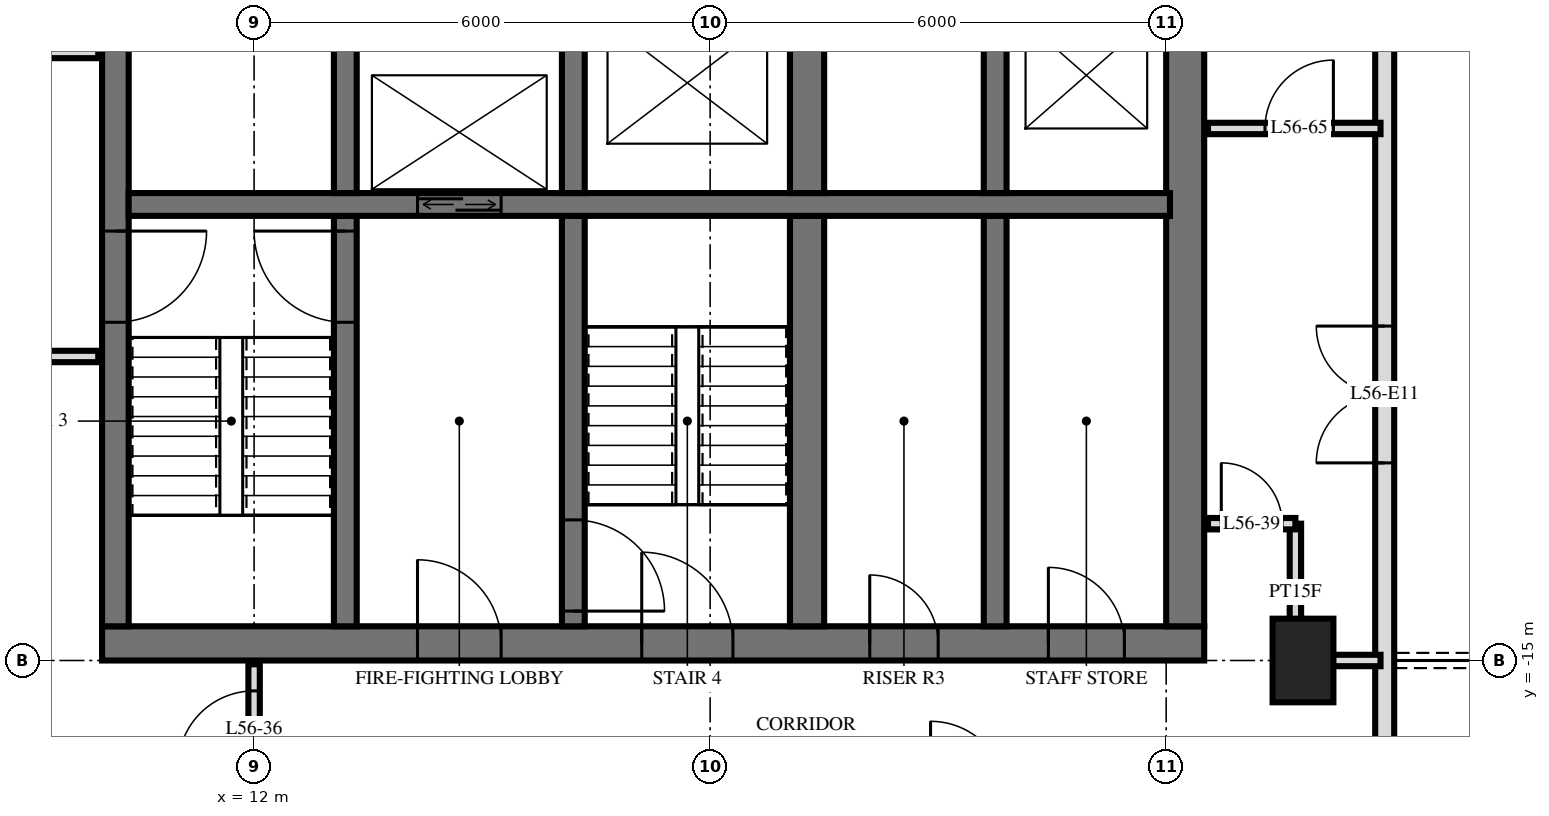
"""IFC4 building model, lengths in metres.
Left out: names, types, materials, properties, quantities, classifications, styles, units other than length and angle.
Written with IfcOpenShell. Run it as: python <this file> out.ifc"""

import sys

from ifc_helpers import new_model, si_unit, direction, frame, frame_2d, origin, origin_2d, place, context, subcontext, project, spatial, rectangle, extrude, element, fill, save


model = new_model("IFC4")
c1 = context("Model", 3, precision=1e-05, world=origin(), true_north=direction((0.0, 1.0)))
c2 = subcontext(c1, "Body", "Model", "MODEL_VIEW")
j1 = project(units=[si_unit("LENGTHUNIT", "METRE"), si_unit("PLANEANGLEUNIT", "RADIAN")], contexts=[c1])
p1 = place(None, origin())
s1 = spatial("IfcSite", under=j1, at=p1, CompositionType="ELEMENT")
p2 = place(p1, origin())
s2 = spatial("IfcBuilding", under=s1, at=p2, CompositionType="ELEMENT")
p3 = place(p2, frame((0.0, 0.0, 215.1)))
s3 = spatial("IfcBuildingStorey", under=s2, at=p3, CompositionType="ELEMENT", Elevation=215.1)
p4 = place(p3, frame((25.8, -15.0, 0.0), z_axis=(0.0, 0.0, 1.0), x_axis=(0.0, 1.0, 0.0)))
e1 = element("IfcColumn", 1, at=p4, inside=s3, PredefinedType="COLUMN", context=c2, shape_type="SweptSolid", body=[
    extrude(rectangle(XDim=1.1, YDim=0.8, at=origin_2d()), origin(), (0.0, 0.0, 1.0), 3.5),
])
p5 = place(p3, frame((10.0, -14.775, 0.0), z_axis=(0.0, 0.0, 1.0), x_axis=(1.0, 0.0, 0.0)))
e2 = element("IfcWall", 2, at=p5, inside=s3, PredefinedType="SHEAR", context=c2, shape_type="SweptSolid", body=[
    extrude(rectangle(XDim=14.5, YDim=0.45, at=frame_2d((7.25, 0.0))), origin(), (0.0, 0.0, 1.0), 3.5),
])
p6 = place(p5, frame((7.1, 0.0, 0.0)))
e3 = element("IfcOpeningElement", 3, at=p6, cuts=e2, PredefinedType="OPENING", context=c2, shape_type="SweptSolid", body=[
    extrude(rectangle(XDim=1.2, YDim=2.1, at=frame_2d((0.6, 1.05))), frame((0.0, 0.235, 0.0), z_axis=(0.0, -1.0, 0.0), x_axis=(1.0, 0.0, 0.0)), (0.0, 0.0, 1.0), 0.47),
])
p7 = place(p5, frame((4.15, 0.0, 0.0)))
e4 = element("IfcOpeningElement", 4, at=p7, cuts=e2, PredefinedType="OPENING", context=c2, shape_type="SweptSolid", body=[
    extrude(rectangle(XDim=1.1, YDim=2.1, at=frame_2d((0.55, 1.05))), frame((0.0, 0.235, 0.0), z_axis=(0.0, -1.0, 0.0), x_axis=(1.0, 0.0, 0.0)), (0.0, 0.0, 1.0), 0.47),
])
p8 = place(p5, frame((10.1, 0.0, 0.0)))
e5 = element("IfcOpeningElement", 5, at=p8, cuts=e2, PredefinedType="OPENING", context=c2, shape_type="SweptSolid", body=[
    extrude(rectangle(XDim=0.9, YDim=2.1, at=frame_2d((0.45, 1.05))), frame((0.0, 0.235, 0.0), z_axis=(0.0, -1.0, 0.0), x_axis=(1.0, 0.0, 0.0)), (0.0, 0.0, 1.0), 0.47),
])
p9 = place(p5, frame((12.45, 0.0, 0.0)))
e6 = element("IfcOpeningElement", 6, at=p9, cuts=e2, PredefinedType="OPENING", context=c2, shape_type="SweptSolid", body=[
    extrude(rectangle(XDim=1.0, YDim=2.1, at=frame_2d((0.5, 1.05))), frame((0.0, 0.235, 0.0), z_axis=(0.0, -1.0, 0.0), x_axis=(1.0, 0.0, 0.0)), (0.0, 0.0, 1.0), 0.47),
])
p10 = place(p3, frame((10.175, -14.55, 0.0), z_axis=(0.0, 0.0, 1.0), x_axis=(0.0, 1.0, 0.0)))
e7 = element("IfcWall", 7, at=p10, inside=s3, PredefinedType="SHEAR", context=c2, shape_type="SweptSolid", body=[
    extrude(rectangle(XDim=14.1, YDim=0.35, at=frame_2d((7.05, 0.0))), origin(), (0.0, 0.0, 1.0), 3.5),
])
p11 = place(p10, frame((8.4, 0.0, 0.0)))
e8 = element("IfcOpeningElement", 8, at=p11, cuts=e7, PredefinedType="OPENING", context=c2, shape_type="SweptSolid", body=[
    extrude(rectangle(XDim=1.4, YDim=2.4, at=frame_2d((0.7, 1.2))), frame((0.0, 0.185, 0.0), z_axis=(0.0, -1.0, 0.0), x_axis=(1.0, 0.0, 0.0)), (0.0, 0.0, 1.0), 0.37),
])
p12 = place(p10, frame((10.0, 0.0, 0.0)))
e9 = element("IfcOpeningElement", 9, at=p12, cuts=e7, PredefinedType="OPENING", context=c2, shape_type="SweptSolid", body=[
    extrude(rectangle(XDim=1.4, YDim=2.4, at=frame_2d((0.7, 1.2))), frame((0.0, 0.185, 0.0), z_axis=(0.0, -1.0, 0.0), x_axis=(1.0, 0.0, 0.0)), (0.0, 0.0, 1.0), 0.37),
])
p13 = place(p10, frame((4.0, 0.0, 0.0)))
e10 = element("IfcOpeningElement", 10, at=p13, cuts=e7, PredefinedType="OPENING", context=c2, shape_type="SweptSolid", body=[
    extrude(rectangle(XDim=1.2, YDim=2.1, at=frame_2d((0.6, 1.05))), frame((0.0, 0.185, 0.0), z_axis=(0.0, -1.0, 0.0), x_axis=(1.0, 0.0, 0.0)), (0.0, 0.0, 1.0), 0.37),
])
p14 = place(p3, frame((24.25, -14.55, 0.0), z_axis=(0.0, 0.0, 1.0), x_axis=(0.0, 1.0, 0.0)))
e11 = element("IfcWall", 11, at=p14, inside=s3, PredefinedType="SHEAR", context=c2, shape_type="SweptSolid", body=[
    extrude(rectangle(XDim=14.1, YDim=0.5, at=frame_2d((7.05, 0.0))), origin(), (0.0, 0.0, 1.0), 3.5),
])
p15 = place(p3, frame((10.35, -9.0, 0.0), z_axis=(0.0, 0.0, 1.0), x_axis=(1.0, 0.0, 0.0)))
e12 = element("IfcWall", 12, at=p15, inside=s3, PredefinedType="SHEAR", context=c2, shape_type="SweptSolid", body=[
    extrude(rectangle(XDim=13.7, YDim=0.3, at=frame_2d((6.85, 0.0))), origin(), (0.0, 0.0, 1.0), 3.5),
])
p16 = place(p15, frame((3.8, 0.0, 0.0)))
e13 = element("IfcOpeningElement", 13, at=p16, cuts=e12, PredefinedType="OPENING", context=c2, shape_type="SweptSolid", body=[
    extrude(rectangle(XDim=1.1, YDim=2.1, at=frame_2d((0.55, 1.05))), frame((0.0, 0.16, 0.0), z_axis=(0.0, -1.0, 0.0), x_axis=(1.0, 0.0, 0.0)), (0.0, 0.0, 1.0), 0.32),
])
p17 = place(p3, frame((13.2, -8.85, 0.0), z_axis=(0.0, 0.0, 1.0), x_axis=(0.0, 1.0, 0.0)))
e14 = element("IfcWall", 14, at=p17, inside=s3, PredefinedType="SHEAR", context=c2, shape_type="SweptSolid", body=[
    extrude(rectangle(XDim=2.3, YDim=0.3, at=frame_2d((1.15, 0.0))), origin(), (0.0, 0.0, 1.0), 3.5),
])
p18 = place(p3, frame((13.2, -14.55, 0.0), z_axis=(0.0, 0.0, 1.0), x_axis=(0.0, 1.0, 0.0)))
e15 = element("IfcWall", 15, at=p18, inside=s3, PredefinedType="SHEAR", context=c2, shape_type="SweptSolid", body=[
    extrude(rectangle(XDim=5.4, YDim=0.3, at=frame_2d((2.7, 0.0))), origin(), (0.0, 0.0, 1.0), 3.5),
])
p19 = place(p18, frame((4.0, 0.0, 0.0)))
e16 = element("IfcOpeningElement", 16, at=p19, cuts=e15, PredefinedType="OPENING", context=c2, shape_type="SweptSolid", body=[
    extrude(rectangle(XDim=1.2, YDim=2.1, at=frame_2d((0.6, 1.05))), frame((0.0, 0.16, 0.0), z_axis=(0.0, -1.0, 0.0), x_axis=(1.0, 0.0, 0.0)), (0.0, 0.0, 1.0), 0.32),
])
p20 = place(p3, frame((16.2, -8.85, 0.0), z_axis=(0.0, 0.0, 1.0), x_axis=(0.0, 1.0, 0.0)))
e17 = element("IfcWall", 17, at=p20, inside=s3, PredefinedType="SHEAR", context=c2, shape_type="SweptSolid", body=[
    extrude(rectangle(XDim=2.3, YDim=0.3, at=frame_2d((1.15, 0.0))), origin(), (0.0, 0.0, 1.0), 3.5),
])
p21 = place(p3, frame((16.2, -14.55, 0.0), z_axis=(0.0, 0.0, 1.0), x_axis=(0.0, 1.0, 0.0)))
e18 = element("IfcWall", 18, at=p21, inside=s3, PredefinedType="SHEAR", context=c2, shape_type="SweptSolid", body=[
    extrude(rectangle(XDim=5.4, YDim=0.3, at=frame_2d((2.7, 0.0))), origin(), (0.0, 0.0, 1.0), 3.5),
])
p22 = place(p21, frame((0.2, 0.0, 0.0)))
e19 = element("IfcOpeningElement", 19, at=p22, cuts=e18, PredefinedType="OPENING", context=c2, shape_type="SweptSolid", body=[
    extrude(rectangle(XDim=1.2, YDim=2.1, at=frame_2d((0.6, 1.05))), frame((0.0, 0.16, 0.0), z_axis=(0.0, -1.0, 0.0), x_axis=(1.0, 0.0, 0.0)), (0.0, 0.0, 1.0), 0.32),
])
p23 = place(p3, frame((19.275, -8.85, 0.0), z_axis=(0.0, 0.0, 1.0), x_axis=(0.0, 1.0, 0.0)))
e20 = element("IfcWall", 20, at=p23, inside=s3, PredefinedType="SHEAR", context=c2, shape_type="SweptSolid", body=[
    extrude(rectangle(XDim=2.3, YDim=0.45, at=frame_2d((1.15, 0.0))), origin(), (0.0, 0.0, 1.0), 3.5),
])
p24 = place(p3, frame((19.275, -14.55, 0.0), z_axis=(0.0, 0.0, 1.0), x_axis=(0.0, 1.0, 0.0)))
e21 = element("IfcWall", 21, at=p24, inside=s3, PredefinedType="SHEAR", context=c2, shape_type="SweptSolid", body=[
    extrude(rectangle(XDim=5.4, YDim=0.45, at=frame_2d((2.7, 0.0))), origin(), (0.0, 0.0, 1.0), 3.5),
])
p25 = place(p3, frame((21.75, -8.85, 0.0), z_axis=(0.0, 0.0, 1.0), x_axis=(0.0, 1.0, 0.0)))
e22 = element("IfcWall", 22, at=p25, inside=s3, PredefinedType="SHEAR", context=c2, shape_type="SweptSolid", body=[
    extrude(rectangle(XDim=2.3, YDim=0.3, at=frame_2d((1.15, 0.0))), origin(), (0.0, 0.0, 1.0), 3.5),
])
p26 = place(p3, frame((21.75, -14.55, 0.0), z_axis=(0.0, 0.0, 1.0), x_axis=(0.0, 1.0, 0.0)))
e23 = element("IfcWall", 23, at=p26, inside=s3, PredefinedType="SHEAR", context=c2, shape_type="SweptSolid", body=[
    extrude(rectangle(XDim=5.4, YDim=0.3, at=frame_2d((2.7, 0.0))), origin(), (0.0, 0.0, 1.0), 3.5),
])
p27 = place(p3, frame((26.875, -24.875, 0.0), z_axis=(0.0, 0.0, 1.0), x_axis=(0.0, 1.0, 0.0)))
e24 = element("IfcWall", 24, at=p27, inside=s3, PredefinedType="SOLIDWALL", context=c2, shape_type="SweptSolid", body=[
    extrude(rectangle(XDim=21.551, YDim=0.25, at=frame_2d((10.775, 0.0))), origin(), (0.0, 0.0, 1.0), 3.22),
])
p28 = place(p27, frame((0.575, 0.0, 0.0)))
e25 = element("IfcOpeningElement", 25, at=p28, cuts=e24, PredefinedType="OPENING", context=c2, shape_type="SweptSolid", body=[
    extrude(rectangle(XDim=1.8, YDim=2.4, at=frame_2d((0.9, 1.2))), frame((0.0, 0.135, 0.0), z_axis=(0.0, -1.0, 0.0), x_axis=(1.0, 0.0, 0.0)), (0.0, 0.0, 1.0), 0.27),
])
p29 = place(p27, frame((5.075, 0.0, 0.0)))
e26 = element("IfcOpeningElement", 26, at=p29, cuts=e24, PredefinedType="OPENING", context=c2, shape_type="SweptSolid", body=[
    extrude(rectangle(XDim=1.8, YDim=2.4, at=frame_2d((0.9, 1.2))), frame((0.0, 0.135, 0.0), z_axis=(0.0, -1.0, 0.0), x_axis=(1.0, 0.0, 0.0)), (0.0, 0.0, 1.0), 0.27),
])
p30 = place(p27, frame((12.475, 0.0, 0.0)))
e27 = element("IfcOpeningElement", 27, at=p30, cuts=e24, PredefinedType="OPENING", context=c2, shape_type="SweptSolid", body=[
    extrude(rectangle(XDim=1.8, YDim=2.4, at=frame_2d((0.9, 1.2))), frame((0.0, 0.135, 0.0), z_axis=(0.0, -1.0, 0.0), x_axis=(1.0, 0.0, 0.0)), (0.0, 0.0, 1.0), 0.27),
])
p31 = place(p3, frame((25.7, -15.0, 0.0), z_axis=(0.0, 0.0, 1.0), x_axis=(0.0, 1.0, 0.0)))
e28 = element("IfcWall", 28, at=p31, inside=s3, PredefinedType="PARTITIONING", context=c2, shape_type="SweptSolid", body=[
    extrude(rectangle(XDim=1.8, YDim=0.15, at=frame_2d((0.9, 0.0))), origin(), (0.0, 0.0, 1.0), 3.22),
])
p32 = place(p3, frame((12.0, -16.8, 0.0), z_axis=(0.0, 0.0, 1.0), x_axis=(0.0, 1.0, 0.0)))
e29 = element("IfcWall", 29, at=p32, inside=s3, PredefinedType="PARTITIONING", context=c2, shape_type="SweptSolid", body=[
    extrude(rectangle(XDim=1.75, YDim=0.15, at=frame_2d((0.875, 0.0))), origin(), (0.0, 0.0, 1.0), 3.22),
])
p33 = place(p32, frame((0.4, 0.0, 0.0)))
e30 = element("IfcOpeningElement", 30, at=p33, cuts=e29, PredefinedType="OPENING", context=c2, shape_type="SweptSolid", body=[
    extrude(rectangle(XDim=1.0, YDim=2.1, at=frame_2d((0.5, 1.05))), frame((0.0, 0.085, 0.0), z_axis=(0.0, -1.0, 0.0), x_axis=(1.0, 0.0, 0.0)), (0.0, 0.0, 1.0), 0.17),
])
p34 = place(p3, frame((25.7, -15.0, 0.0), z_axis=(0.0, 0.0, 1.0), x_axis=(1.0, 0.0, 0.0)))
e31 = element("IfcWall", 31, at=p34, inside=s3, PredefinedType="PARTITIONING", context=c2, shape_type="SweptSolid", body=[
    extrude(rectangle(XDim=1.12, YDim=0.15, at=frame_2d((0.56, 0.0))), origin(), (0.0, 0.0, 1.0), 3.22),
])
p35 = place(p3, frame((24.55, -13.2, 0.0), z_axis=(0.0, 0.0, 1.0), x_axis=(1.0, 0.0, 0.0)))
e32 = element("IfcWall", 32, at=p35, inside=s3, PredefinedType="PARTITIONING", context=c2, shape_type="SweptSolid", body=[
    extrude(rectangle(XDim=1.15, YDim=0.15, at=frame_2d((0.575, 0.0))), origin(), (0.0, 0.0, 1.0), 3.22),
])
p36 = place(p35, frame((0.175, 0.0, 0.0)))
e33 = element("IfcOpeningElement", 33, at=p36, cuts=e32, PredefinedType="OPENING", context=c2, shape_type="SweptSolid", body=[
    extrude(rectangle(XDim=0.8, YDim=2.1, at=frame_2d((0.4, 1.05))), frame((0.0, 0.085, 0.0), z_axis=(0.0, -1.0, 0.0), x_axis=(1.0, 0.0, 0.0)), (0.0, 0.0, 1.0), 0.17),
])
p37 = place(p3, frame((-9.95, -11.0, 0.0), z_axis=(0.0, 0.0, 1.0), x_axis=(1.0, 0.0, 0.0)))
e34 = element("IfcWall", 34, at=p37, inside=s3, PredefinedType="PARTITIONING", context=c2, shape_type="SweptSolid", body=[
    extrude(rectangle(XDim=19.9, YDim=0.15, at=frame_2d((9.95, 0.0))), origin(), (0.0, 0.0, 1.0), 3.22),
])
p38 = place(p37, frame((9.45, 0.0, 0.0)))
e35 = element("IfcOpeningElement", 35, at=p38, cuts=e34, PredefinedType="OPENING", context=c2, shape_type="SweptSolid", body=[
    extrude(rectangle(XDim=1.0, YDim=2.1, at=frame_2d((0.5, 1.05))), frame((0.0, 0.085, 0.0), z_axis=(0.0, -1.0, 0.0), x_axis=(1.0, 0.0, 0.0)), (0.0, 0.0, 1.0), 0.17),
])
p39 = place(p37, frame((3.45, 0.0, 0.0)))
e36 = element("IfcOpeningElement", 36, at=p39, cuts=e34, PredefinedType="OPENING", context=c2, shape_type="SweptSolid", body=[
    extrude(rectangle(XDim=1.0, YDim=2.1, at=frame_2d((0.5, 1.05))), frame((0.0, 0.085, 0.0), z_axis=(0.0, -1.0, 0.0), x_axis=(1.0, 0.0, 0.0)), (0.0, 0.0, 1.0), 0.17),
])
p40 = place(p3, frame((24.55, -8.0, 0.0), z_axis=(0.0, 0.0, 1.0), x_axis=(1.0, 0.0, 0.0)))
e37 = element("IfcWall", 37, at=p40, inside=s3, PredefinedType="PARTITIONING", context=c2, shape_type="SweptSolid", body=[
    extrude(rectangle(XDim=2.27, YDim=0.15, at=frame_2d((1.135, 0.0))), origin(), (0.0, 0.0, 1.0), 3.22),
])
p41 = place(p40, frame((0.75, 0.0, 0.0)))
e38 = element("IfcOpeningElement", 38, at=p41, cuts=e37, PredefinedType="OPENING", context=c2, shape_type="SweptSolid", body=[
    extrude(rectangle(XDim=0.9, YDim=2.1, at=frame_2d((0.45, 1.05))), frame((0.0, 0.085, 0.0), z_axis=(0.0, -1.0, 0.0), x_axis=(1.0, 0.0, 0.0)), (0.0, 0.0, 1.0), 0.17),
])
p42 = place(p3, frame((-9.95, -7.0, 0.0), z_axis=(0.0, 0.0, 1.0), x_axis=(1.0, 0.0, 0.0)))
e39 = element("IfcWall", 39, at=p42, inside=s3, PredefinedType="PARTITIONING", context=c2, shape_type="SweptSolid", body=[
    extrude(rectangle(XDim=19.9, YDim=0.15, at=frame_2d((9.95, 0.0))), origin(), (0.0, 0.0, 1.0), 3.22),
])
p43 = place(p42, frame((9.45, 0.0, 0.0)))
e40 = element("IfcOpeningElement", 40, at=p43, cuts=e39, PredefinedType="OPENING", context=c2, shape_type="SweptSolid", body=[
    extrude(rectangle(XDim=1.0, YDim=2.1, at=frame_2d((0.5, 1.05))), frame((0.0, 0.085, 0.0), z_axis=(0.0, -1.0, 0.0), x_axis=(1.0, 0.0, 0.0)), (0.0, 0.0, 1.0), 0.17),
])
p44 = place(p42, frame((15.45, 0.0, 0.0)))
e41 = element("IfcOpeningElement", 41, at=p44, cuts=e39, PredefinedType="OPENING", context=c2, shape_type="SweptSolid", body=[
    extrude(rectangle(XDim=1.0, YDim=2.1, at=frame_2d((0.5, 1.05))), frame((0.0, 0.085, 0.0), z_axis=(0.0, -1.0, 0.0), x_axis=(1.0, 0.0, 0.0)), (0.0, 0.0, 1.0), 0.17),
])
p45 = place(p30, origin())
e42 = element("IfcDoor", 42, at=p45, inside=s3, OperationType="DOUBLE_DOOR_SINGLE_SWING", PredefinedType="DOOR", context=c2, shape_type="SweptSolid", body=[
    extrude(rectangle(XDim=1.8, YDim=2.4, at=frame_2d((0.9, 1.2))), frame((0.0, 0.025, 0.0), z_axis=(0.0, -1.0, 0.0), x_axis=(1.0, 0.0, 0.0)), (0.0, 0.0, 1.0), 0.05),
])
fill(e27, e42)
p46 = place(p16, origin())
e43 = element("IfcDoor", 43, at=p46, inside=s3, OperationType="DOUBLE_DOOR_SLIDING", PredefinedType="USERDEFINED", context=c2, shape_type="SweptSolid", body=[
    extrude(rectangle(XDim=1.1, YDim=2.1, at=frame_2d((0.55, 1.05))), frame((0.0, 0.025, 0.0), z_axis=(0.0, -1.0, 0.0), x_axis=(1.0, 0.0, 0.0)), (0.0, 0.0, 1.0), 0.05),
])
fill(e13, e43)
p47 = place(p13, frame((0.6, 0.0, 0.0), z_axis=(0.0, 0.0, 1.0), x_axis=(-1.0, 0.0, 0.0)))
e44 = element("IfcDoor", 44, at=p47, inside=s3, OperationType="SINGLE_SWING_RIGHT", PredefinedType="DOOR", context=c2, shape_type="SweptSolid", body=[
    extrude(rectangle(XDim=1.2, YDim=2.1, at=frame_2d((0.0, 1.05))), frame((0.0, -0.025, 0.0), z_axis=(0.0, 1.0, 0.0), x_axis=(-1.0, 0.0, 0.0)), (0.0, 0.0, 1.0), 0.05),
])
fill(e10, e44)
p48 = place(p6, origin())
e45 = element("IfcDoor", 45, at=p48, inside=s3, OperationType="SINGLE_SWING_RIGHT", PredefinedType="DOOR", context=c2, shape_type="SweptSolid", body=[
    extrude(rectangle(XDim=1.2, YDim=2.1, at=frame_2d((0.6, 1.05))), frame((0.0, 0.025, 0.0), z_axis=(0.0, -1.0, 0.0), x_axis=(1.0, 0.0, 0.0)), (0.0, 0.0, 1.0), 0.05),
])
fill(e3, e45)
p49 = place(p7, origin())
e46 = element("IfcDoor", 46, at=p49, inside=s3, OperationType="SINGLE_SWING_RIGHT", PredefinedType="DOOR", context=c2, shape_type="SweptSolid", body=[
    extrude(rectangle(XDim=1.1, YDim=2.1, at=frame_2d((0.55, 1.05))), frame((0.0, 0.025, 0.0), z_axis=(0.0, -1.0, 0.0), x_axis=(1.0, 0.0, 0.0)), (0.0, 0.0, 1.0), 0.05),
])
fill(e4, e46)
p50 = place(p8, origin())
e47 = element("IfcDoor", 47, at=p50, inside=s3, OperationType="SINGLE_SWING_RIGHT", PredefinedType="DOOR", context=c2, shape_type="SweptSolid", body=[
    extrude(rectangle(XDim=0.9, YDim=2.1, at=frame_2d((0.45, 1.05))), frame((0.0, 0.025, 0.0), z_axis=(0.0, -1.0, 0.0), x_axis=(1.0, 0.0, 0.0)), (0.0, 0.0, 1.0), 0.05),
])
fill(e5, e47)
p51 = place(p9, origin())
e48 = element("IfcDoor", 48, at=p51, inside=s3, OperationType="SINGLE_SWING_RIGHT", PredefinedType="DOOR", context=c2, shape_type="SweptSolid", body=[
    extrude(rectangle(XDim=1.0, YDim=2.1, at=frame_2d((0.5, 1.05))), frame((0.0, 0.025, 0.0), z_axis=(0.0, -1.0, 0.0), x_axis=(1.0, 0.0, 0.0)), (0.0, 0.0, 1.0), 0.05),
])
fill(e6, e48)
p52 = place(p19, origin())
e49 = element("IfcDoor", 49, at=p52, inside=s3, OperationType="SINGLE_SWING_LEFT", PredefinedType="DOOR", context=c2, shape_type="SweptSolid", body=[
    extrude(rectangle(XDim=1.2, YDim=2.1, at=frame_2d((0.6, 1.05))), frame((0.0, 0.025, 0.0), z_axis=(0.0, -1.0, 0.0), x_axis=(1.0, 0.0, 0.0)), (0.0, 0.0, 1.0), 0.05),
])
fill(e16, e49)
p53 = place(p22, frame((0.6, 0.0, 0.0), z_axis=(0.0, 0.0, 1.0), x_axis=(-1.0, 0.0, 0.0)))
e50 = element("IfcDoor", 50, at=p53, inside=s3, OperationType="SINGLE_SWING_LEFT", PredefinedType="DOOR", context=c2, shape_type="SweptSolid", body=[
    extrude(rectangle(XDim=1.2, YDim=2.1, at=frame_2d((0.0, 1.05))), frame((0.0, -0.025, 0.0), z_axis=(0.0, 1.0, 0.0), x_axis=(-1.0, 0.0, 0.0)), (0.0, 0.0, 1.0), 0.05),
])
fill(e19, e50)
p54 = place(p33, origin())
e51 = element("IfcDoor", 51, at=p54, inside=s3, OperationType="SINGLE_SWING_RIGHT", PredefinedType="DOOR", context=c2, shape_type="SweptSolid", body=[
    extrude(rectangle(XDim=1.0, YDim=2.1, at=frame_2d((0.5, 1.05))), frame((0.0, 0.025, 0.0), z_axis=(0.0, -1.0, 0.0), x_axis=(1.0, 0.0, 0.0)), (0.0, 0.0, 1.0), 0.05),
])
fill(e30, e51)
p55 = place(p36, origin())
e52 = element("IfcDoor", 52, at=p55, inside=s3, OperationType="SINGLE_SWING_RIGHT", PredefinedType="DOOR", context=c2, shape_type="SweptSolid", body=[
    extrude(rectangle(XDim=0.8, YDim=2.1, at=frame_2d((0.4, 1.05))), frame((0.0, 0.025, 0.0), z_axis=(0.0, -1.0, 0.0), x_axis=(1.0, 0.0, 0.0)), (0.0, 0.0, 1.0), 0.05),
])
fill(e33, e52)
p56 = place(p41, origin())
e53 = element("IfcDoor", 53, at=p56, inside=s3, OperationType="SINGLE_SWING_LEFT", PredefinedType="DOOR", context=c2, shape_type="SweptSolid", body=[
    extrude(rectangle(XDim=0.9, YDim=2.1, at=frame_2d((0.45, 1.05))), frame((0.0, 0.025, 0.0), z_axis=(0.0, -1.0, 0.0), x_axis=(1.0, 0.0, 0.0)), (0.0, 0.0, 1.0), 0.05),
])
fill(e38, e53)
save(model, sys.argv[1])
